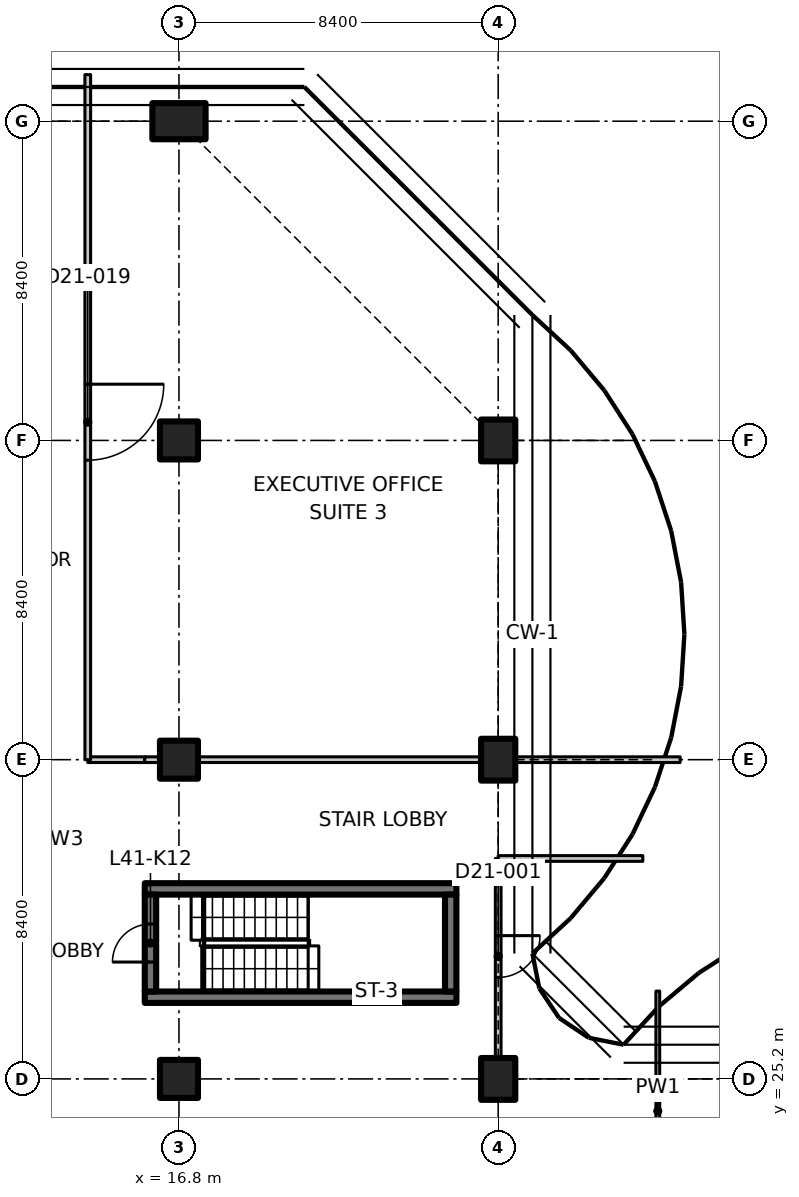
"""IFC4 building model, lengths in metres.
Left out: names, types, materials, properties, quantities, classifications, styles, units other than length and angle.
Written with IfcOpenShell. Run it as: python <this file> out.ifc"""

import sys

from ifc_helpers import new_model, si_unit, direction, frame, frame_2d, origin, origin_2d, place, context, subcontext, project, spatial, polyline, rectangle, outline, extrude, element, fill, save


model = new_model("IFC4")
c1 = context("Model", 3, precision=1e-05, world=origin(), true_north=direction((0.0, 1.0)))
c2 = subcontext(c1, "Body", "Model", "MODEL_VIEW")
j1 = project(units=[si_unit("LENGTHUNIT", "METRE"), si_unit("PLANEANGLEUNIT", "RADIAN")], contexts=[c1])
p1 = place(None, origin())
s1 = spatial("IfcSite", under=j1, at=p1, CompositionType="ELEMENT")
p2 = place(p1, origin())
s2 = spatial("IfcBuilding", under=s1, at=p2, CompositionType="ELEMENT")
p3 = place(p2, frame((0.0, 0.0, 166.8)))
s3 = spatial("IfcBuildingStorey", under=s2, at=p3, CompositionType="ELEMENT", Elevation=166.8)
for number, where, z_axis, x_axis in (
    (1, (16.8, 25.2, 0.0), (0.0, 0.0, 1.0), (1.0, 0.0, 0.0)),
    (2, (16.8, 33.6, 0.0), (0.0, 0.0, 1.0), (1.0, 0.0, 0.0)),
    (3, (16.8, 42.0, 0.0), (0.0, 0.0, 1.0), (1.0, 0.0, 0.0)),
):
    element("IfcColumn", number, at=place(p3, frame(where, z_axis=z_axis, x_axis=x_axis)), inside=s3, PredefinedType="COLUMN", context=c2, shape_type="SweptSolid", body=[
        extrude(rectangle(XDim=1.0, YDim=1.0, at=origin_2d()), origin(), (0.0, 0.0, 1.0), 3.35),
    ])
p4 = place(p3, frame((16.8, 50.4, 0.0), z_axis=(0.0, 0.0, 1.0), x_axis=(0.0, 1.0, 0.0)))
e4 = element("IfcColumn", 4, at=p4, inside=s3, PredefinedType="COLUMN", context=c2, shape_type="SweptSolid", body=[
    extrude(rectangle(XDim=0.95, YDim=1.4, at=origin_2d()), origin(), (0.0, 0.0, 1.0), 3.35),
])
for number, where, z_axis, x_axis in (
    (5, (25.2, 25.2, 0.0), (0.0, 0.0, 1.0), (1.0, 0.0, 0.0)),
    (6, (25.2, 33.6, 0.0), (0.0, 0.0, 1.0), (1.0, 0.0, 0.0)),
    (7, (25.2, 42.0, 0.0), (0.0, 0.0, 1.0), (1.0, 0.0, 0.0)),
):
    element("IfcColumn", number, at=place(p3, frame(where, z_axis=z_axis, x_axis=x_axis)), inside=s3, PredefinedType="COLUMN", context=c2, shape_type="SweptSolid", body=[
        extrude(rectangle(XDim=0.9, YDim=1.1, at=origin_2d()), origin(), (0.0, 0.0, 1.0), 3.35),
    ])
for number, where, z_axis, x_axis in (
    (8, (15.9, 27.35, 0.0), (0.0, 0.0, 1.0), (1.0, 0.0, 0.0)),
    (9, (15.9, 30.2, 0.0), (0.0, 0.0, 1.0), (1.0, 0.0, 0.0)),
):
    element("IfcWall", number, at=place(p3, frame(where, z_axis=z_axis, x_axis=x_axis)), inside=s3, PredefinedType="SHEAR", context=c2, shape_type="SweptSolid", body=[
        extrude(rectangle(XDim=8.2, YDim=0.3, at=frame_2d((4.1, 0.0))), origin(), (0.0, 0.0, 1.0), 3.35),
    ])
p5 = place(p3, frame((16.05, 27.5, 0.0), z_axis=(0.0, 0.0, 1.0), x_axis=(0.0, 1.0, 0.0)))
e10 = element("IfcWall", 10, at=p5, inside=s3, PredefinedType="SHEAR", context=c2, shape_type="SweptSolid", body=[
    extrude(rectangle(XDim=2.55, YDim=0.3, at=frame_2d((1.275, 0.0))), origin(), (0.0, 0.0, 1.0), 3.35),
])
p6 = place(p5, frame((0.775, 0.0, 0.0)))
e11 = element("IfcOpeningElement", 11, at=p6, cuts=e10, PredefinedType="OPENING", context=c2, shape_type="SweptSolid", body=[
    extrude(rectangle(XDim=1.0, YDim=2.1, at=frame_2d((0.5, 1.05))), frame((0.0, 0.16, 0.0), z_axis=(0.0, -1.0, 0.0), x_axis=(1.0, 0.0, 0.0)), (0.0, 0.0, 1.0), 0.32),
])
p7 = place(p3, frame((23.95, 27.5, 0.0), z_axis=(0.0, 0.0, 1.0), x_axis=(0.0, 1.0, 0.0)))
e12 = element("IfcWall", 12, at=p7, inside=s3, PredefinedType="SHEAR", context=c2, shape_type="SweptSolid", body=[
    extrude(rectangle(XDim=2.55, YDim=0.3, at=frame_2d((1.275, 0.0))), origin(), (0.0, 0.0, 1.0), 3.35),
])
p8 = place(p3, frame((29.4, 27.511, 0.0), z_axis=(0.0, 0.0, 1.0), x_axis=(0.0, -1.0, 0.0)))
e13 = element("IfcWall", 13, at=p8, inside=s3, PredefinedType="PARTITIONING", context=c2, shape_type="SweptSolid", body=[
    extrude(outline(polyline([(0.0, 0.0), (6.311, 0.0), (6.311, 3.33), (2.761, 3.33), (2.759, 2.98), (1.863, 2.98), (1.861, 3.33), (0.236, 3.33), (0.0, 3.33), (0.0, 0.0)])), frame((0.0, 0.05, 0.0), z_axis=(0.0, -1.0, 0.0), x_axis=(1.0, 0.0, 0.0)), (0.0, 0.0, 1.0), 0.1),
])
p9 = place(p3, frame((25.2, 31.0, 0.0), z_axis=(0.0, 0.0, 1.0), x_axis=(0.0, -1.0, 0.0)))
e14 = element("IfcWall", 14, at=p9, inside=s3, PredefinedType="PARTITIONING", context=c2, shape_type="SweptSolid", body=[
    extrude(outline(polyline([(0.0, 0.0), (5.23, 0.0), (5.23, 2.98), (0.0, 2.98), (0.0, 0.0)])), frame((0.0, 0.075, 0.0), z_axis=(0.0, -1.0, 0.0), x_axis=(1.0, 0.0, 0.0)), (0.0, 0.0, 1.0), 0.15),
])
p10 = place(p9, frame((2.03, 0.0, 0.0)))
e15 = element("IfcOpeningElement", 15, at=p10, cuts=e14, PredefinedType="OPENING", context=c2, shape_type="SweptSolid", body=[
    extrude(rectangle(XDim=1.1, YDim=2.1, at=frame_2d((0.55, 1.05))), frame((0.0, 0.085, 0.0), z_axis=(0.0, -1.0, 0.0), x_axis=(1.0, 0.0, 0.0)), (0.0, 0.0, 1.0), 0.17),
])
p11 = place(p3, frame((25.2, 31.0, 0.0), z_axis=(0.0, 0.0, 1.0), x_axis=(1.0, 0.0, 0.0)))
e16 = element("IfcWall", 16, at=p11, inside=s3, PredefinedType="PARTITIONING", context=c2, shape_type="SweptSolid", body=[
    extrude(rectangle(XDim=3.806, YDim=0.15, at=frame_2d((1.903, 0.0))), origin(), (0.0, 0.0, 1.0), 2.98),
])
p12 = place(p3, frame((14.4, 33.6, 0.0), z_axis=(0.0, 0.0, 1.0), x_axis=(1.0, 0.0, 0.0)))
e17 = element("IfcWall", 17, at=p12, inside=s3, PredefinedType="PARTITIONING", context=c2, shape_type="SweptSolid", body=[
    extrude(rectangle(XDim=1.5, YDim=0.15, at=frame_2d((0.75, 0.0))), origin(), (0.0, 0.0, 1.0), 3.33),
])
p13 = place(p3, frame((15.9, 33.6, 0.0), z_axis=(0.0, 0.0, 1.0), x_axis=(1.0, 0.0, 0.0)))
e18 = element("IfcWall", 18, at=p13, inside=s3, PredefinedType="PARTITIONING", context=c2, shape_type="SweptSolid", body=[
    extrude(rectangle(XDim=0.38, YDim=0.15, at=frame_2d((0.19, 0.0))), origin(), (0.0, 0.0, 1.0), 3.33),
])
p14 = place(p3, frame((17.32, 33.6, 0.0), z_axis=(0.0, 0.0, 1.0), x_axis=(1.0, 0.0, 0.0)))
e19 = element("IfcWall", 19, at=p14, inside=s3, PredefinedType="PARTITIONING", context=c2, shape_type="SweptSolid", body=[
    extrude(rectangle(XDim=7.41, YDim=0.15, at=frame_2d((3.705, 0.0))), origin(), (0.0, 0.0, 1.0), 3.33),
])
p15 = place(p3, frame((25.67, 33.6, 0.0), z_axis=(0.0, 0.0, 1.0), x_axis=(1.0, 0.0, 0.0)))
e20 = element("IfcWall", 20, at=p15, inside=s3, PredefinedType="PARTITIONING", context=c2, shape_type="SweptSolid", body=[
    extrude(rectangle(XDim=4.318, YDim=0.15, at=frame_2d((2.159, 0.0))), origin(), (0.0, 0.0, 1.0), 2.98),
])
p16 = place(p3, frame((14.4, 51.625, 0.0), z_axis=(0.0, 0.0, 1.0), x_axis=(0.0, -1.0, 0.0)))
e21 = element("IfcWall", 21, at=p16, inside=s3, PredefinedType="PARTITIONING", context=c2, shape_type="SweptSolid", body=[
    extrude(outline(polyline([(0.0, 0.0), (18.025, 0.0), (18.025, 3.33), (1.675, 3.33), (1.673, 2.98), (0.777, 2.98), (0.775, 3.33), (0.145, 3.33), (0.0, 3.33), (0.0, 0.0)])), frame((0.0, 0.075, 0.0), z_axis=(0.0, -1.0, 0.0), x_axis=(1.0, 0.0, 0.0)), (0.0, 0.0, 1.0), 0.15),
])
p17 = place(p16, frame((8.145, 0.0, 0.0)))
e22 = element("IfcOpeningElement", 22, at=p17, cuts=e21, PredefinedType="OPENING", context=c2, shape_type="SweptSolid", body=[
    extrude(rectangle(XDim=2.0, YDim=2.4, at=frame_2d((1.0, 1.2))), frame((0.0, 0.085, 0.0), z_axis=(0.0, -1.0, 0.0), x_axis=(1.0, 0.0, 0.0)), (0.0, 0.0, 1.0), 0.17),
])
p18 = place(p6, origin())
e23 = element("IfcDoor", 23, at=p18, inside=s3, OperationType="SINGLE_SWING_RIGHT", PredefinedType="DOOR", context=c2, shape_type="SweptSolid", body=[
    extrude(rectangle(XDim=1.0, YDim=2.1, at=frame_2d((0.5, 1.05))), frame((0.0, 0.025, 0.0), z_axis=(0.0, -1.0, 0.0), x_axis=(1.0, 0.0, 0.0)), (0.0, 0.0, 1.0), 0.05),
])
fill(e11, e23)
p19 = place(p10, origin())
e24 = element("IfcDoor", 24, at=p19, inside=s3, OperationType="SINGLE_SWING_RIGHT", PredefinedType="DOOR", context=c2, shape_type="SweptSolid", body=[
    extrude(rectangle(XDim=1.1, YDim=2.1, at=frame_2d((0.55, 1.05))), frame((0.0, 0.025, 0.0), z_axis=(0.0, -1.0, 0.0), x_axis=(1.0, 0.0, 0.0)), (0.0, 0.0, 1.0), 0.05),
])
fill(e15, e24)
p20 = place(p17, origin())
e25 = element("IfcDoor", 25, at=p20, inside=s3, OperationType="DOUBLE_DOOR_SINGLE_SWING", PredefinedType="DOOR", context=c2, shape_type="SweptSolid", body=[
    extrude(rectangle(XDim=2.0, YDim=2.4, at=frame_2d((1.0, 1.2))), frame((0.0, 0.025, 0.0), z_axis=(0.0, -1.0, 0.0), x_axis=(1.0, 0.0, 0.0)), (0.0, 0.0, 1.0), 0.05),
])
fill(e22, e25)
save(model, sys.argv[1])
